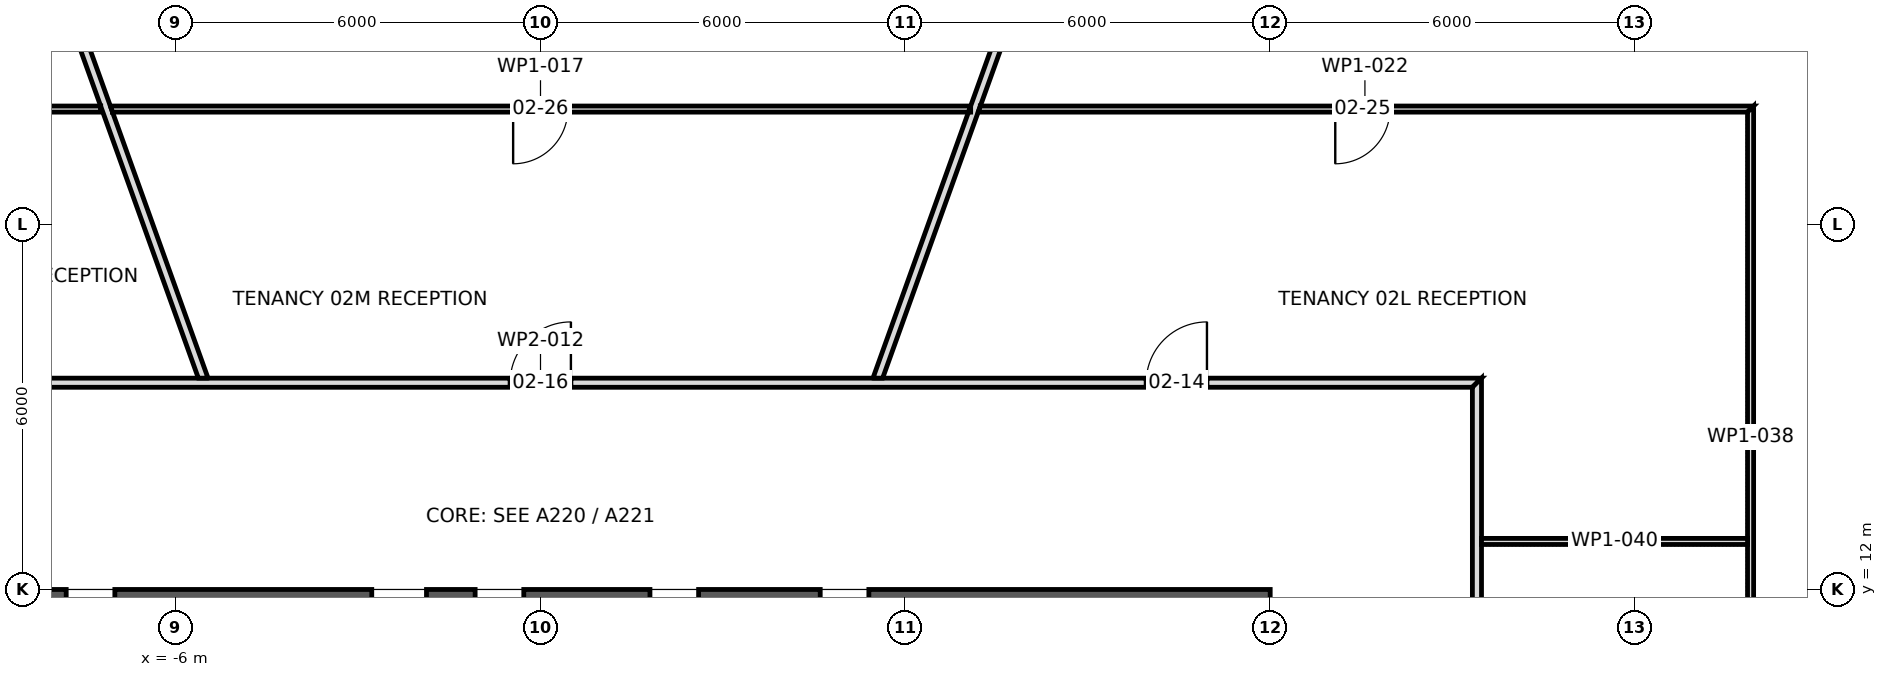
"""IFC4 building model, lengths in metres.
Left out: names, types, materials, properties, quantities, classifications, styles, units other than length and angle.
Written with IfcOpenShell. Run it as: python <this file> out.ifc"""

import sys

from ifc_helpers import new_model, si_unit, direction, frame, frame_2d, origin, place, context, subcontext, project, spatial, polyline, rectangle, outline, extrude, element, fill, save


model = new_model("IFC4")
c1 = context("Model", 3, precision=1e-05, world=origin(), true_north=direction((0.0, 1.0)))
c2 = subcontext(c1, "Body", "Model", "MODEL_VIEW")
j1 = project(units=[si_unit("LENGTHUNIT", "METRE"), si_unit("PLANEANGLEUNIT", "RADIAN")], contexts=[c1])
p1 = place(None, origin())
s1 = spatial("IfcSite", under=j1, at=p1, CompositionType="ELEMENT")
p2 = place(p1, origin())
s2 = spatial("IfcBuilding", under=s1, at=p2, CompositionType="ELEMENT")
p3 = place(p2, frame((0.0, 0.0, 36.1)))
s3 = spatial("IfcBuildingStorey", under=s2, at=p3, CompositionType="ELEMENT", Elevation=36.1)
p4 = place(p3, frame((-12.0, 11.7, 0.0), z_axis=(0.0, 0.0, 1.0), x_axis=(1.0, 0.0, 0.0)))
e1 = element("IfcWall", 1, at=p4, inside=s3, PredefinedType="SHEAR", context=c2, shape_type="SweptSolid", body=[
    extrude(rectangle(XDim=24.0, YDim=0.6, at=frame_2d((12.0, 0.0))), origin(), (0.0, 0.0, 1.0), 4.2),
])
p5 = place(p4, frame((9.225, 0.0, 0.0)))
e2 = element("IfcOpeningElement", 2, at=p5, cuts=e1, PredefinedType="OPENING", context=c2, shape_type="SweptSolid", body=[
    extrude(rectangle(XDim=0.9, YDim=2.1, at=frame_2d((0.45, 1.05))), frame((0.0, 0.312, 0.0), z_axis=(0.0, -1.0, 0.0), x_axis=(1.0, 0.0, 0.0)), (0.0, 0.0, 1.0), 0.624),
])
p6 = place(p4, frame((10.925, 0.0, 0.0)))
e3 = element("IfcOpeningElement", 3, at=p6, cuts=e1, PredefinedType="OPENING", context=c2, shape_type="SweptSolid", body=[
    extrude(rectangle(XDim=0.8, YDim=2.1, at=frame_2d((0.4, 1.05))), frame((0.0, 0.312, 0.0), z_axis=(0.0, -1.0, 0.0), x_axis=(1.0, 0.0, 0.0)), (0.0, 0.0, 1.0), 0.624),
])
p7 = place(p4, frame((4.2, 0.0, 0.0)))
e4 = element("IfcOpeningElement", 4, at=p7, cuts=e1, PredefinedType="OPENING", context=c2, shape_type="SweptSolid", body=[
    extrude(rectangle(XDim=0.8, YDim=2.1, at=frame_2d((0.4, 1.05))), frame((0.0, 0.312, 0.0), z_axis=(0.0, -1.0, 0.0), x_axis=(1.0, 0.0, 0.0)), (0.0, 0.0, 1.0), 0.624),
])
p8 = place(p4, frame((13.8, 0.0, 0.0)))
e5 = element("IfcOpeningElement", 5, at=p8, cuts=e1, PredefinedType="OPENING", context=c2, shape_type="SweptSolid", body=[
    extrude(rectangle(XDim=0.8, YDim=2.1, at=frame_2d((0.4, 1.05))), frame((0.0, 0.312, 0.0), z_axis=(0.0, -1.0, 0.0), x_axis=(1.0, 0.0, 0.0)), (0.0, 0.0, 1.0), 0.624),
])
p9 = place(p4, frame((16.6, 0.0, 0.0)))
e6 = element("IfcOpeningElement", 6, at=p9, cuts=e1, PredefinedType="OPENING", context=c2, shape_type="SweptSolid", body=[
    extrude(rectangle(XDim=0.8, YDim=2.1, at=frame_2d((0.4, 1.05))), frame((0.0, 0.312, 0.0), z_axis=(0.0, -1.0, 0.0), x_axis=(1.0, 0.0, 0.0)), (0.0, 0.0, 1.0), 0.624),
])
p10 = place(p3, frame((-19.95, 19.9, 0.0), z_axis=(0.0, 0.0, 1.0), x_axis=(1.0, 0.0, 0.0)))
e7 = element("IfcWall", 7, at=p10, inside=s3, PredefinedType="PARTITIONING", context=c2, shape_type="SweptSolid", body=[
    extrude(outline(polyline([(12.718, 0.05), (10.901, 0.05), (9.084, 0.05), (7.267, 0.05), (5.45, 0.05), (3.634, 0.05), (1.817, 0.05), (0.0, 0.05), (0.1, -0.05), (1.903, -0.05), (3.705, -0.05), (5.508, -0.05), (7.31, -0.05), (9.113, -0.05), (10.915, -0.05), (12.718, -0.05), (12.718, 0.05)])), origin(), (0.0, 0.0, 1.0), 3.9),
])
p11 = place(p10, frame((9.13, 0.0, 0.0)))
e8 = element("IfcOpeningElement", 8, at=p11, cuts=e7, PredefinedType="OPENING", context=c2, shape_type="SweptSolid", body=[
    extrude(rectangle(XDim=0.9, YDim=2.1, at=frame_2d((0.45, 1.05))), frame((0.0, 0.062, 0.0), z_axis=(0.0, -1.0, 0.0), x_axis=(1.0, 0.0, 0.0)), (0.0, 0.0, 1.0), 0.124),
])
p12 = place(p3, frame((-15.475, 15.4, 0.0), z_axis=(0.0, 0.0, 1.0), x_axis=(1.0, 0.0, 0.0)))
e9 = element("IfcWall", 9, at=p12, inside=s3, PredefinedType="PARTITIONING", context=c2, shape_type="SweptSolid", body=[
    extrude(outline(polyline([(0.15, -0.075), (2.066, -0.075), (3.981, -0.075), (5.897, -0.075), (7.812, -0.075), (9.728, -0.075), (11.644, -0.075), (13.56, -0.075), (15.475, -0.075), (17.391, -0.075), (19.306, -0.075), (21.222, -0.075), (23.138, -0.075), (25.053, -0.075), (26.969, -0.075), (28.885, -0.075), (30.8, -0.075), (30.95, 0.075), (29.016, 0.075), (27.081, 0.075), (25.147, 0.075), (23.212, 0.075), (21.278, 0.075), (19.344, 0.075), (17.409, 0.075), (15.475, 0.075), (13.541, 0.075), (11.606, 0.075), (9.672, 0.075), (7.738, 0.075), (5.803, 0.075), (3.869, 0.075), (1.935, 0.075), (0.0, 0.075), (0.15, -0.075)])), origin(), (0.0, 0.0, 1.0), 3.9),
])
p13 = place(p12, frame((5.415, 0.0, 0.0)))
e10 = element("IfcOpeningElement", 10, at=p13, cuts=e9, PredefinedType="OPENING", context=c2, shape_type="SweptSolid", body=[
    extrude(rectangle(XDim=1.0, YDim=2.1, at=frame_2d((0.5, 1.05))), frame((0.0, 0.087, 0.0), z_axis=(0.0, -1.0, 0.0), x_axis=(1.0, 0.0, 0.0)), (0.0, 0.0, 1.0), 0.174),
])
p14 = place(p12, frame((25.435, 0.0, 0.0)))
e11 = element("IfcOpeningElement", 11, at=p14, cuts=e9, PredefinedType="OPENING", context=c2, shape_type="SweptSolid", body=[
    extrude(rectangle(XDim=1.0, YDim=2.1, at=frame_2d((0.5, 1.05))), frame((0.0, 0.087, 0.0), z_axis=(0.0, -1.0, 0.0), x_axis=(1.0, 0.0, 0.0)), (0.0, 0.0, 1.0), 0.174),
])
p15 = place(p12, frame((14.975, 0.0, 0.0)))
e12 = element("IfcOpeningElement", 12, at=p15, cuts=e9, PredefinedType="OPENING", context=c2, shape_type="SweptSolid", body=[
    extrude(rectangle(XDim=1.0, YDim=2.1, at=frame_2d((0.5, 1.05))), frame((0.0, 0.087, 0.0), z_axis=(0.0, -1.0, 0.0), x_axis=(1.0, 0.0, 0.0)), (0.0, 0.0, 1.0), 0.174),
])
p16 = place(p3, frame((-10.119, 28.209, 0.0), z_axis=(0.0, 0.0, 1.0), x_axis=(0.337949016046, -0.941164418448, 0.0)))
e13 = element("IfcWall", 13, at=p16, inside=s3, PredefinedType="PARTITIONING", context=c2, shape_type="SweptSolid", body=[
    extrude(outline(polyline([(0.0, -0.075), (1.75, -0.075), (3.5, -0.075), (5.249, -0.075), (6.999, -0.075), (8.749, -0.075), (8.749, -0.074), (8.751, -0.075), (10.335, -0.075), (11.919, -0.075), (13.503, -0.075), (13.555, 0.069), (13.555, 0.069), (13.557, 0.074), (13.557, 0.075), (12.008, 0.075), (10.458, 0.075), (8.909, 0.075), (8.908, 0.073), (8.903, 0.075), (7.125, 0.075), (5.347, 0.075), (3.57, 0.075), (1.792, 0.075), (0.014, 0.075), (0.0, 0.0), (0.0, -0.071), (0.0, -0.075)])), origin(), (0.0, 0.0, 1.0), 2.91),
])
p17 = place(p3, frame((-7.074, 19.9, 0.0), z_axis=(0.0, 0.0, 1.0), x_axis=(1.0, 0.0, 0.0)))
e14 = element("IfcWall", 14, at=p17, inside=s3, PredefinedType="PARTITIONING", context=c2, shape_type="SweptSolid", body=[
    extrude(outline(polyline([(0.036, -0.05), (1.795, -0.05), (3.555, -0.05), (5.314, -0.05), (7.074, -0.05), (8.833, -0.05), (10.593, -0.05), (12.353, -0.05), (14.112, -0.05), (14.148, 0.05), (14.148, 0.05), (12.379, 0.05), (10.611, 0.05), (8.843, 0.05), (7.074, 0.05), (5.305, 0.05), (3.537, 0.05), (1.769, 0.05), (0.0, 0.05), (0.0, 0.05), (0.036, -0.05)])), origin(), (0.0, 0.0, 1.0), 3.9),
])
p18 = place(p17, frame((6.624, 0.0, 0.0)))
e15 = element("IfcOpeningElement", 15, at=p18, cuts=e14, PredefinedType="OPENING", context=c2, shape_type="SweptSolid", body=[
    extrude(rectangle(XDim=0.9, YDim=2.1, at=frame_2d((0.45, 1.05))), frame((0.0, 0.062, 0.0), z_axis=(0.0, -1.0, 0.0), x_axis=(1.0, 0.0, 0.0)), (0.0, 0.0, 1.0), 0.124),
])
p19 = place(p3, frame((5.538, 15.45, 0.0), z_axis=(0.0, 0.0, 1.0), x_axis=(0.337949016046, 0.941164418448, 0.0)))
e16 = element("IfcWall", 16, at=p19, inside=s3, PredefinedType="PARTITIONING", context=c2, shape_type="SweptSolid", body=[
    extrude(outline(polyline([(0.053, -0.075), (1.638, -0.075), (3.222, -0.075), (4.806, -0.075), (4.808, -0.074), (4.808, -0.075), (6.558, -0.075), (8.308, -0.075), (10.057, -0.075), (11.807, -0.075), (13.557, -0.075), (13.557, -0.068), (13.556, 0.0), (13.543, 0.075), (11.785, 0.075), (10.028, 0.075), (8.27, 0.075), (6.512, 0.075), (4.754, 0.075), (4.66, 0.041), (4.648, 0.075), (3.099, 0.075), (1.549, 0.075), (0.0, 0.075), (0.0, 0.074), (0.053, -0.075)])), origin(), (0.0, 0.0, 1.0), 2.91),
])
p20 = place(p3, frame((7.198, 19.9, 0.0), z_axis=(0.0, 0.0, 1.0), x_axis=(1.0, 0.0, 0.0)))
e17 = element("IfcWall", 17, at=p20, inside=s3, PredefinedType="PARTITIONING", context=c2, shape_type="SweptSolid", body=[
    extrude(outline(polyline([(0.0, -0.05), (1.807, -0.05), (3.615, -0.05), (5.422, -0.05), (7.23, -0.05), (9.037, -0.05), (10.844, -0.05), (12.652, -0.05), (12.652, -0.05), (12.752, 0.05), (10.935, 0.05), (9.119, 0.05), (7.302, 0.05), (5.485, 0.05), (3.669, 0.05), (1.852, 0.05), (0.035, 0.05), (0.0, -0.049), (0.0, -0.05)])), origin(), (0.0, 0.0, 1.0), 3.9),
])
p21 = place(p20, frame((5.872, 0.0, 0.0)))
e18 = element("IfcOpeningElement", 18, at=p21, cuts=e17, PredefinedType="OPENING", context=c2, shape_type="SweptSolid", body=[
    extrude(rectangle(XDim=0.9, YDim=2.1, at=frame_2d((0.45, 1.05))), frame((0.0, 0.062, 0.0), z_axis=(0.0, -1.0, 0.0), x_axis=(1.0, 0.0, 0.0)), (0.0, 0.0, 1.0), 0.124),
])
p22 = place(p3, frame((15.4, -6.96, 0.0), z_axis=(0.0, 0.0, 1.0), x_axis=(0.0, 1.0, 0.0)))
e19 = element("IfcWall", 19, at=p22, inside=s3, PredefinedType="PARTITIONING", context=c2, shape_type="SweptSolid", body=[
    extrude(outline(polyline([(0.0, -0.075), (1.87, -0.075), (3.739, -0.075), (5.609, -0.075), (7.478, -0.075), (9.348, -0.075), (11.217, -0.075), (13.087, -0.075), (14.957, -0.075), (16.826, -0.075), (18.696, -0.075), (20.565, -0.075), (22.435, -0.075), (22.285, 0.075), (20.428, 0.075), (18.571, 0.075), (16.714, 0.075), (14.857, 0.075), (13.0, 0.075), (11.143, 0.075), (9.285, 0.075), (7.428, 0.075), (5.571, 0.075), (3.714, 0.075), (1.857, 0.075), (0.0, 0.075), (0.0, -0.075)])), origin(), (0.0, 0.0, 1.0), 3.9),
])
p23 = place(p22, frame((3.62, 0.0, 0.0)))
e20 = element("IfcOpeningElement", 20, at=p23, cuts=e19, PredefinedType="OPENING", context=c2, shape_type="SweptSolid", body=[
    extrude(rectangle(XDim=1.0, YDim=2.1, at=frame_2d((0.5, 1.05))), frame((0.0, 0.087, 0.0), z_axis=(0.0, -1.0, 0.0), x_axis=(1.0, 0.0, 0.0)), (0.0, 0.0, 1.0), 0.174),
])
p24 = place(p22, frame((10.58, 0.0, 0.0)))
e21 = element("IfcOpeningElement", 21, at=p24, cuts=e19, PredefinedType="OPENING", context=c2, shape_type="SweptSolid", body=[
    extrude(rectangle(XDim=1.0, YDim=2.1, at=frame_2d((0.5, 1.05))), frame((0.0, 0.087, 0.0), z_axis=(0.0, -1.0, 0.0), x_axis=(1.0, 0.0, 0.0)), (0.0, 0.0, 1.0), 0.174),
])
p25 = place(p22, frame((16.335, 0.0, 0.0)))
e22 = element("IfcOpeningElement", 22, at=p25, cuts=e19, PredefinedType="OPENING", context=c2, shape_type="SweptSolid", body=[
    extrude(rectangle(XDim=1.0, YDim=2.1, at=frame_2d((0.5, 1.05))), frame((0.0, 0.087, 0.0), z_axis=(0.0, -1.0, 0.0), x_axis=(1.0, 0.0, 0.0)), (0.0, 0.0, 1.0), 0.174),
])
p26 = place(p3, frame((19.9, 9.103, 0.0), z_axis=(0.0, 0.0, 1.0), x_axis=(0.0, 1.0, 0.0)))
e23 = element("IfcWall", 23, at=p26, inside=s3, PredefinedType="PARTITIONING", context=c2, shape_type="SweptSolid", body=[
    extrude(outline(polyline([(0.0, -0.05), (1.808, -0.05), (3.616, -0.05), (5.424, -0.05), (7.232, -0.05), (9.04, -0.05), (10.847, -0.05), (10.747, 0.05), (8.956, 0.05), (7.165, 0.05), (5.374, 0.05), (3.583, 0.05), (1.791, 0.05), (0.0, 0.05), (0.0, -0.05)])), origin(), (0.0, 0.0, 1.0), 3.9),
])
p27 = place(p3, frame((19.854, 8.979, 0.0), z_axis=(0.0, 0.0, 1.0), x_axis=(0.911433390516, 0.411447657245, 0.0)))
e24 = element("IfcWall", 24, at=p27, inside=s3, PredefinedType="PARTITIONING", context=c2, shape_type="SweptSolid", body=[
    extrude(outline(polyline([(11.948, -0.075), (11.948, -0.063), (11.946, 0.001), (11.927, 0.075), (9.963, 0.075), (7.998, 0.075), (6.033, 0.075), (4.068, 0.075), (2.104, 0.075), (0.139, 0.075), (0.138, 0.073), (0.133, 0.075), (0.0, 0.075), (0.0, -0.043), (0.07, -0.075), (2.05, -0.075), (4.029, -0.075), (6.009, -0.075), (7.989, -0.075), (9.968, -0.075), (11.948, -0.075)])), origin(), (0.0, 0.0, 1.0), 2.91),
])
p28 = place(p3, frame((19.85, 12.79, 0.0), z_axis=(0.0, 0.0, 1.0), x_axis=(-1.0, 0.0, 0.0)))
e25 = element("IfcWall", 25, at=p28, inside=s3, PredefinedType="PARTITIONING", context=c2, shape_type="SweptSolid", body=[
    extrude(rectangle(XDim=4.375, YDim=0.1, at=frame_2d((2.188, 0.0))), origin(), (0.0, 0.0, 1.0), 3.9),
])
p29 = place(p14, origin())
e26 = element("IfcDoor", 26, at=p29, inside=s3, OperationType="SINGLE_SWING_LEFT", PredefinedType="DOOR", context=c2, shape_type="SweptSolid", body=[
    extrude(rectangle(XDim=1.0, YDim=2.1, at=frame_2d((0.5, 1.05))), frame((0.0, 0.025, 0.0), z_axis=(0.0, -1.0, 0.0), x_axis=(1.0, 0.0, 0.0)), (0.0, 0.0, 1.0), 0.05),
])
fill(e11, e26)
p30 = place(p15, origin())
e27 = element("IfcDoor", 27, at=p30, inside=s3, OperationType="SINGLE_SWING_LEFT", PredefinedType="DOOR", context=c2, shape_type="SweptSolid", body=[
    extrude(rectangle(XDim=1.0, YDim=2.1, at=frame_2d((0.5, 1.05))), frame((0.0, 0.025, 0.0), z_axis=(0.0, -1.0, 0.0), x_axis=(1.0, 0.0, 0.0)), (0.0, 0.0, 1.0), 0.05),
])
fill(e12, e27)
p31 = place(p21, frame((0.9, 0.0, 0.0), z_axis=(0.0, 0.0, 1.0), x_axis=(-1.0, 0.0, 0.0)))
e28 = element("IfcDoor", 28, at=p31, inside=s3, OperationType="SINGLE_SWING_LEFT", PredefinedType="DOOR", context=c2, shape_type="SweptSolid", body=[
    extrude(rectangle(XDim=0.9, YDim=2.1, at=frame_2d((0.45, 1.05))), frame((0.0, 0.025, 0.0), z_axis=(0.0, -1.0, 0.0), x_axis=(1.0, 0.0, 0.0)), (0.0, 0.0, 1.0), 0.05),
])
fill(e18, e28)
p32 = place(p18, frame((0.9, 0.0, 0.0), z_axis=(0.0, 0.0, 1.0), x_axis=(-1.0, 0.0, 0.0)))
e29 = element("IfcDoor", 29, at=p32, inside=s3, OperationType="SINGLE_SWING_LEFT", PredefinedType="DOOR", context=c2, shape_type="SweptSolid", body=[
    extrude(rectangle(XDim=0.9, YDim=2.1, at=frame_2d((0.45, 1.05))), frame((0.0, 0.025, 0.0), z_axis=(0.0, -1.0, 0.0), x_axis=(1.0, 0.0, 0.0)), (0.0, 0.0, 1.0), 0.05),
])
fill(e15, e29)
save(model, sys.argv[1])
